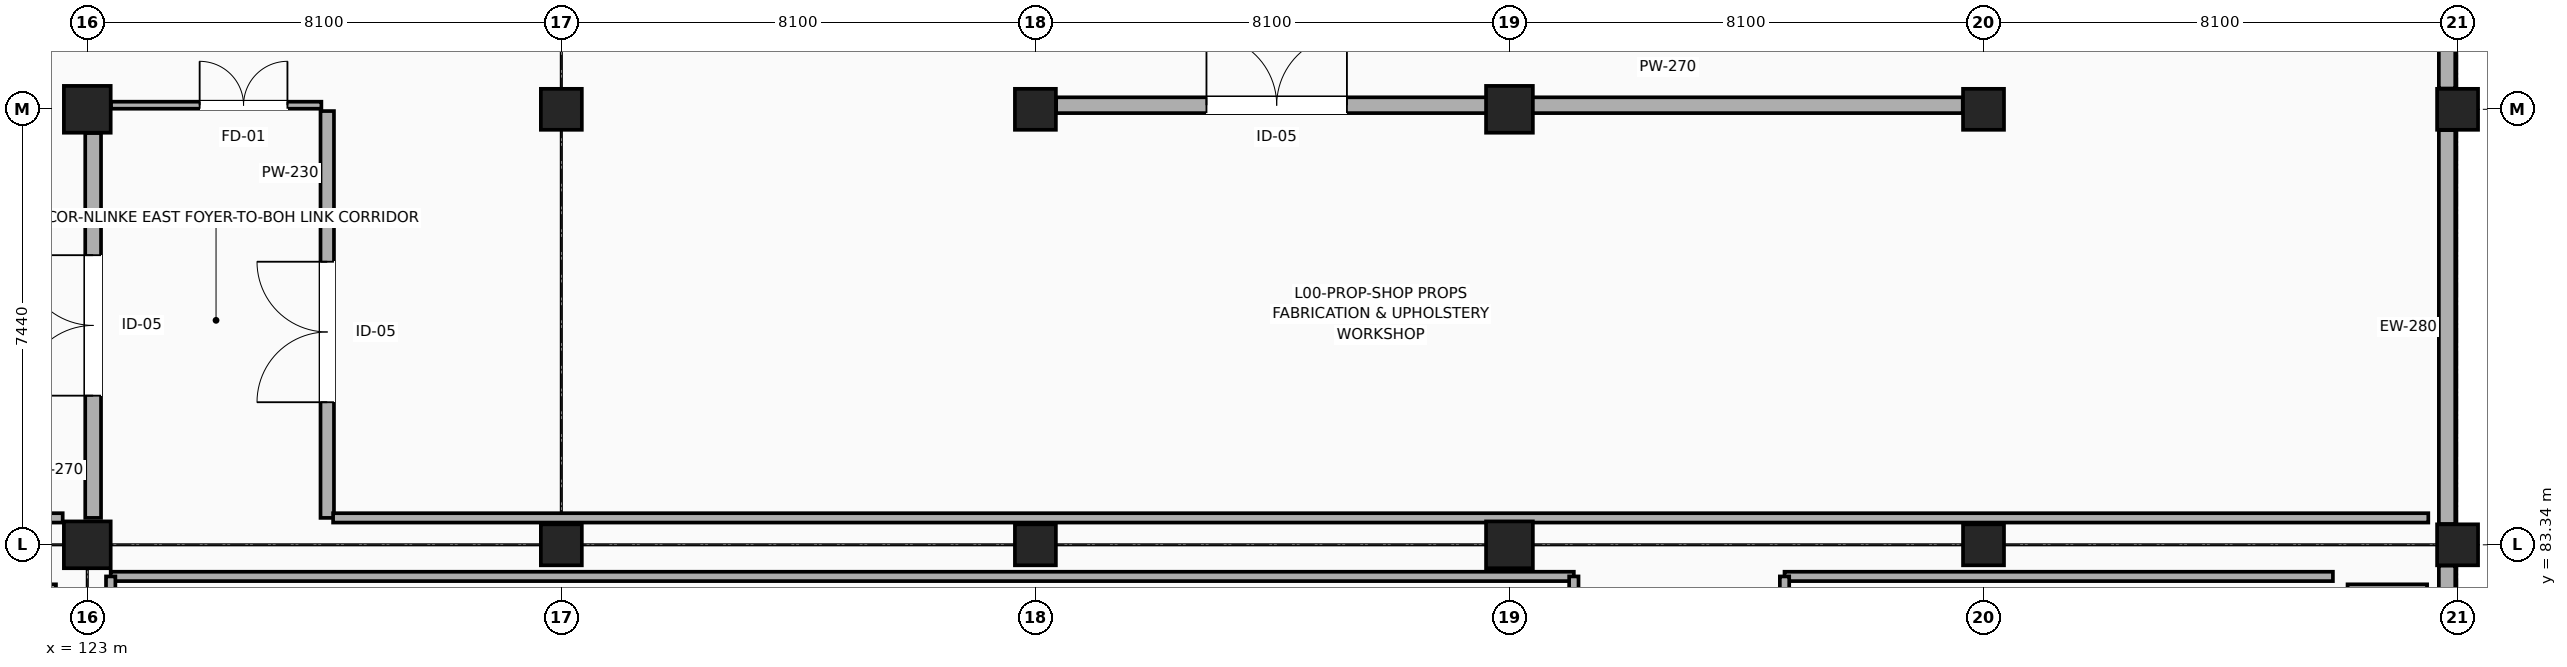
"""IFC4 building model, lengths in metres.
Left out: names, types, materials, properties, quantities, classifications, styles, units other than length and angle.
Written with IfcOpenShell. Run it as: python <this file> out.ifc"""

import sys

from ifc_helpers import new_model, si_unit, direction, frame, frame_2d, origin, origin_2d, place, context, subcontext, project, spatial, rectangle, extrude, element, fill, save


model = new_model("IFC4")
c1 = context("Model", 3, precision=1e-05, world=origin(), true_north=direction((0.0, 1.0)))
c2 = subcontext(c1, "Body", "Model", "MODEL_VIEW")
j1 = project(units=[si_unit("LENGTHUNIT", "METRE"), si_unit("PLANEANGLEUNIT", "RADIAN")], contexts=[c1])
p1 = place(None, origin())
s1 = spatial("IfcSite", under=j1, at=p1, CompositionType="ELEMENT")
p2 = place(p1, origin())
s2 = spatial("IfcBuilding", under=s1, at=p2, CompositionType="ELEMENT")
p3 = place(p2, origin())
s3 = spatial("IfcBuildingStorey", under=s2, at=p3, CompositionType="ELEMENT", Elevation=0.0)
for number, where, z_axis, x_axis in (
    (1, (123.0, 83.34, 0.0), (0.0, 0.0, 1.0), (1.0, 0.0, 0.0)),
    (2, (123.0, 90.78, 0.0), (0.0, 0.0, 1.0), (1.0, 0.0, 0.0)),
):
    element("IfcColumn", number, at=place(p3, frame(where, z_axis=z_axis, x_axis=x_axis)), inside=s3, PredefinedType="COLUMN", context=c2, shape_type="SweptSolid", body=[
        extrude(rectangle(XDim=0.8, YDim=0.8, at=origin_2d()), origin(), (0.0, 0.0, 1.0), 5.4),
    ])
for number, where, z_axis, x_axis in (
    (3, (131.1, 83.34, 0.0), (0.0, 0.0, 1.0), (1.0, 0.0, 0.0)),
    (4, (131.1, 90.78, 0.0), (0.0, 0.0, 1.0), (1.0, 0.0, 0.0)),
    (5, (139.2, 83.34, 0.0), (0.0, 0.0, 1.0), (1.0, 0.0, 0.0)),
    (6, (139.2, 90.78, 0.0), (0.0, 0.0, 1.0), (1.0, 0.0, 0.0)),
):
    element("IfcColumn", number, at=place(p3, frame(where, z_axis=z_axis, x_axis=x_axis)), inside=s3, PredefinedType="COLUMN", context=c2, shape_type="SweptSolid", body=[
        extrude(rectangle(XDim=0.7, YDim=0.7, at=origin_2d()), origin(), (0.0, 0.0, 1.0), 5.4),
    ])
for number, where, z_axis, x_axis in (
    (7, (147.3, 83.34, 0.0), (0.0, 0.0, 1.0), (1.0, 0.0, 0.0)),
    (8, (147.3, 90.78, 0.0), (0.0, 0.0, 1.0), (1.0, 0.0, 0.0)),
):
    element("IfcColumn", number, at=place(p3, frame(where, z_axis=z_axis, x_axis=x_axis)), inside=s3, PredefinedType="COLUMN", context=c2, shape_type="SweptSolid", body=[
        extrude(rectangle(XDim=0.8, YDim=0.8, at=origin_2d()), origin(), (0.0, 0.0, 1.0), 5.4),
    ])
for number, where, z_axis, x_axis in (
    (9, (155.4, 83.34, 0.0), (0.0, 0.0, 1.0), (1.0, 0.0, 0.0)),
    (10, (155.4, 90.78, 0.0), (0.0, 0.0, 1.0), (1.0, 0.0, 0.0)),
    (11, (163.5, 83.34, 0.0), (0.0, 0.0, 1.0), (1.0, 0.0, 0.0)),
    (12, (163.5, 90.78, 0.0), (0.0, 0.0, 1.0), (1.0, 0.0, 0.0)),
):
    element("IfcColumn", number, at=place(p3, frame(where, z_axis=z_axis, x_axis=x_axis)), inside=s3, PredefinedType="COLUMN", context=c2, shape_type="SweptSolid", body=[
        extrude(rectangle(XDim=0.7, YDim=0.7, at=origin_2d()), origin(), (0.0, 0.0, 1.0), 5.4),
    ])
p4 = place(p3, frame((163.32, 82.985, 0.0), z_axis=(0.0, 0.0, 1.0), x_axis=(0.0, -1.0, 0.0)))
e13 = element("IfcWall", 13, at=p4, inside=s3, PredefinedType="SOLIDWALL", context=c2, shape_type="SweptSolid", body=[
    extrude(rectangle(XDim=6.73, YDim=0.28, at=frame_2d((3.365, 0.0))), origin(), (0.0, 0.0, 1.0), 4.787),
])
for number, where, z_axis, x_axis in (
    (14, (163.32, 83.695, 0.0), (0.0, 0.0, 1.0), (0.0, 1.0, 0.0)),
    (15, (163.32, 91.135, 0.0), (0.0, 0.0, 1.0), (0.0, 1.0, 0.0)),
):
    element("IfcWall", number, at=place(p3, frame(where, z_axis=z_axis, x_axis=x_axis)), inside=s3, PredefinedType="SOLIDWALL", context=c2, shape_type="SweptSolid", body=[
        extrude(rectangle(XDim=6.73, YDim=0.28, at=frame_2d((3.365, 0.0))), origin(), (0.0, 0.0, 1.0), 4.787),
    ])
p5 = place(p3, frame((121.105, 82.605, 0.0), z_axis=(0.0, 0.0, 1.0), x_axis=(1.0, 0.0, 0.0)))
e16 = element("IfcWall", 16, at=p5, inside=s3, PredefinedType="PARTITIONING", context=c2, shape_type="SweptSolid", body=[
    extrude(rectangle(XDim=1.36, YDim=0.12, at=frame_2d((0.68, 0.0))), origin(), (0.0, 0.0, 1.0), 5.085),
])
p6 = place(p3, frame((161.62, 82.605, 0.0), z_axis=(0.0, 0.0, 1.0), x_axis=(1.0, 0.0, 0.0)))
e17 = element("IfcWall", 17, at=p6, inside=s3, PredefinedType="PARTITIONING", context=c2, shape_type="SweptSolid", body=[
    extrude(rectangle(XDim=1.36, YDim=0.12, at=frame_2d((0.68, 0.0))), origin(), (0.0, 0.0, 1.0), 5.085),
])
p7 = place(p3, frame((123.405, 90.85, 0.0), z_axis=(0.0, 0.0, 1.0), x_axis=(1.0, 0.0, 0.0)))
e18 = element("IfcWall", 18, at=p7, inside=s3, PredefinedType="PARTITIONING", context=c2, shape_type="SweptSolid", body=[
    extrude(rectangle(XDim=3.595, YDim=0.12, at=frame_2d((1.797, 0.0))), origin(), (0.0, 0.0, 1.0), 4.137),
])
p8 = place(p7, frame((1.515, 0.0, 0.0)))
e19 = element("IfcOpeningElement", 19, at=p8, cuts=e18, PredefinedType="OPENING", context=c2, shape_type="SweptSolid", body=[
    extrude(rectangle(XDim=1.5, YDim=2.2, at=frame_2d((0.75, 1.1))), frame((0.0, 0.07, 0.0), z_axis=(0.0, -1.0, 0.0), x_axis=(1.0, 0.0, 0.0)), (0.0, 0.0, 1.0), 0.14),
])
p9 = place(p3, frame((123.1, 83.8, 0.0), z_axis=(0.0, 0.0, 1.0), x_axis=(0.0, 1.0, 0.0)))
e20 = element("IfcWall", 20, at=p9, inside=s3, PredefinedType="SOLIDWALL", context=c2, shape_type="SweptSolid", body=[
    extrude(rectangle(XDim=6.575, YDim=0.27, at=frame_2d((3.288, 0.0))), origin(), (0.0, 0.0, 1.0), 4.337),
])
p10 = place(p9, frame((2.088, 0.0, 0.0)))
e21 = element("IfcOpeningElement", 21, at=p10, cuts=e20, PredefinedType="OPENING", context=c2, shape_type="SweptSolid", body=[
    extrude(rectangle(XDim=2.4, YDim=2.8, at=frame_2d((1.2, 1.4))), frame((0.0, 0.145, 0.0), z_axis=(0.0, -1.0, 0.0), x_axis=(1.0, 0.0, 0.0)), (0.0, 0.0, 1.0), 0.29),
])
p11 = place(p3, frame((127.1, 83.8, 0.0), z_axis=(0.0, 0.0, 1.0), x_axis=(0.0, 1.0, 0.0)))
e22 = element("IfcWall", 22, at=p11, inside=s3, PredefinedType="SOLIDWALL", context=c2, shape_type="SweptSolid", body=[
    extrude(rectangle(XDim=6.95, YDim=0.23, at=frame_2d((3.475, 0.0))), origin(), (0.0, 0.0, 1.0), 4.137),
])
p12 = place(p11, frame((1.976, 0.0, 0.0)))
e23 = element("IfcOpeningElement", 23, at=p12, cuts=e22, PredefinedType="OPENING", context=c2, shape_type="SweptSolid", body=[
    extrude(rectangle(XDim=2.4, YDim=2.8, at=frame_2d((1.2, 1.4))), frame((0.0, 0.125, 0.0), z_axis=(0.0, -1.0, 0.0), x_axis=(1.0, 0.0, 0.0)), (0.0, 0.0, 1.0), 0.25),
])
p13 = place(p3, frame((139.555, 90.85, 0.0), z_axis=(0.0, 0.0, 1.0), x_axis=(1.0, 0.0, 0.0)))
e24 = element("IfcWall", 24, at=p13, inside=s3, PredefinedType="SOLIDWALL", context=c2, shape_type="SweptSolid", body=[
    extrude(rectangle(XDim=15.49, YDim=0.27, at=frame_2d((7.745, 0.0))), origin(), (0.0, 0.0, 1.0), 4.137),
])
p14 = place(p13, frame((2.568, 0.0, 0.0)))
e25 = element("IfcOpeningElement", 25, at=p14, cuts=e24, PredefinedType="OPENING", context=c2, shape_type="SweptSolid", body=[
    extrude(rectangle(XDim=2.4, YDim=2.8, at=frame_2d((1.2, 1.4))), frame((0.0, 0.145, 0.0), z_axis=(0.0, -1.0, 0.0), x_axis=(1.0, 0.0, 0.0)), (0.0, 0.0, 1.0), 0.29),
])
p15 = place(p3, frame((123.4, 82.8, 0.0), z_axis=(0.0, 0.0, 1.0), x_axis=(1.0, 0.0, 0.0)))
e26 = element("IfcWall", 26, at=p15, inside=s3, PredefinedType="PARTITIONING", context=c2, shape_type="SweptSolid", body=[
    extrude(rectangle(XDim=25.0, YDim=0.16, at=frame_2d((12.5, 0.0))), origin(), (0.0, 0.0, 1.0), 4.337),
])
p16 = place(p3, frame((123.4, 68.88, 0.0), z_axis=(0.0, 0.0, 1.0), x_axis=(0.0, 1.0, 0.0)))
e27 = element("IfcWall", 27, at=p16, inside=s3, PredefinedType="PARTITIONING", context=c2, shape_type="SweptSolid", body=[
    extrude(rectangle(XDim=13.92, YDim=0.16, at=frame_2d((6.96, 0.0))), origin(), (0.0, 0.0, 1.0), 4.137),
])
p17 = place(p3, frame((148.4, 79.25, 0.0), z_axis=(0.0, 0.0, 1.0), x_axis=(0.0, 1.0, 0.0)))
e28 = element("IfcWall", 28, at=p17, inside=s3, PredefinedType="PARTITIONING", context=c2, shape_type="SweptSolid", body=[
    extrude(rectangle(XDim=3.55, YDim=0.16, at=frame_2d((1.775, 0.0))), origin(), (0.0, 0.0, 1.0), 5.085),
])
p18 = place(p3, frame((152.0, 82.8, 0.0), z_axis=(0.0, 0.0, 1.0), x_axis=(1.0, 0.0, 0.0)))
e29 = element("IfcWall", 29, at=p18, inside=s3, PredefinedType="PARTITIONING", context=c2, shape_type="SweptSolid", body=[
    extrude(rectangle(XDim=9.37, YDim=0.16, at=frame_2d((4.685, 0.0))), origin(), (0.0, 0.0, 1.0), 4.337),
])
p19 = place(p3, frame((152.0, 79.25, 0.0), z_axis=(0.0, 0.0, 1.0), x_axis=(0.0, 1.0, 0.0)))
e30 = element("IfcWall", 30, at=p19, inside=s3, PredefinedType="PARTITIONING", context=c2, shape_type="SweptSolid", body=[
    extrude(rectangle(XDim=3.55, YDim=0.16, at=frame_2d((1.775, 0.0))), origin(), (0.0, 0.0, 1.0), 5.085),
])
p20 = place(p3, frame((99.12, 83.8, 0.0), z_axis=(0.0, 0.0, 1.0), x_axis=(1.0, 0.0, 0.0)))
e31 = element("IfcWall", 31, at=p20, inside=s3, PredefinedType="PARTITIONING", context=c2, shape_type="SweptSolid", body=[
    extrude(rectangle(XDim=23.46, YDim=0.16, at=frame_2d((11.73, 0.0))), origin(), (0.0, 0.0, 1.0), 4.337),
])
p21 = place(p3, frame((127.2, 83.8, 0.0), z_axis=(0.0, 0.0, 1.0), x_axis=(1.0, 0.0, 0.0)))
e32 = element("IfcWall", 32, at=p21, inside=s3, PredefinedType="PARTITIONING", context=c2, shape_type="SweptSolid", body=[
    extrude(rectangle(XDim=35.8, YDim=0.16, at=frame_2d((17.9, 0.0))), origin(), (0.0, 0.0, 1.0), 4.337),
])
p22 = place(p8, origin())
e33 = element("IfcDoor", 33, at=p22, inside=s3, OperationType="DOUBLE_DOOR_SINGLE_SWING", PredefinedType="DOOR", context=c2, shape_type="SweptSolid", body=[
    extrude(rectangle(XDim=1.5, YDim=2.2, at=frame_2d((0.75, 1.1))), frame((0.0, 0.025, 0.0), z_axis=(0.0, -1.0, 0.0), x_axis=(1.0, 0.0, 0.0)), (0.0, 0.0, 1.0), 0.05),
])
fill(e19, e33)
p23 = place(p10, origin())
e34 = element("IfcDoor", 34, at=p23, inside=s3, OperationType="DOUBLE_DOOR_SINGLE_SWING", PredefinedType="DOOR", context=c2, shape_type="SweptSolid", body=[
    extrude(rectangle(XDim=2.4, YDim=2.8, at=frame_2d((1.2, 1.4))), frame((0.0, 0.025, 0.0), z_axis=(0.0, -1.0, 0.0), x_axis=(1.0, 0.0, 0.0)), (0.0, 0.0, 1.0), 0.05),
])
fill(e21, e34)
p24 = place(p12, origin())
e35 = element("IfcDoor", 35, at=p24, inside=s3, OperationType="DOUBLE_DOOR_SINGLE_SWING", PredefinedType="DOOR", context=c2, shape_type="SweptSolid", body=[
    extrude(rectangle(XDim=2.4, YDim=2.8, at=frame_2d((1.2, 1.4))), frame((0.0, 0.025, 0.0), z_axis=(0.0, -1.0, 0.0), x_axis=(1.0, 0.0, 0.0)), (0.0, 0.0, 1.0), 0.05),
])
fill(e23, e35)
p25 = place(p14, origin())
e36 = element("IfcDoor", 36, at=p25, inside=s3, OperationType="DOUBLE_DOOR_SINGLE_SWING", PredefinedType="DOOR", context=c2, shape_type="SweptSolid", body=[
    extrude(rectangle(XDim=2.4, YDim=2.8, at=frame_2d((1.2, 1.4))), frame((0.0, 0.025, 0.0), z_axis=(0.0, -1.0, 0.0), x_axis=(1.0, 0.0, 0.0)), (0.0, 0.0, 1.0), 0.05),
])
fill(e25, e36)
save(model, sys.argv[1])
